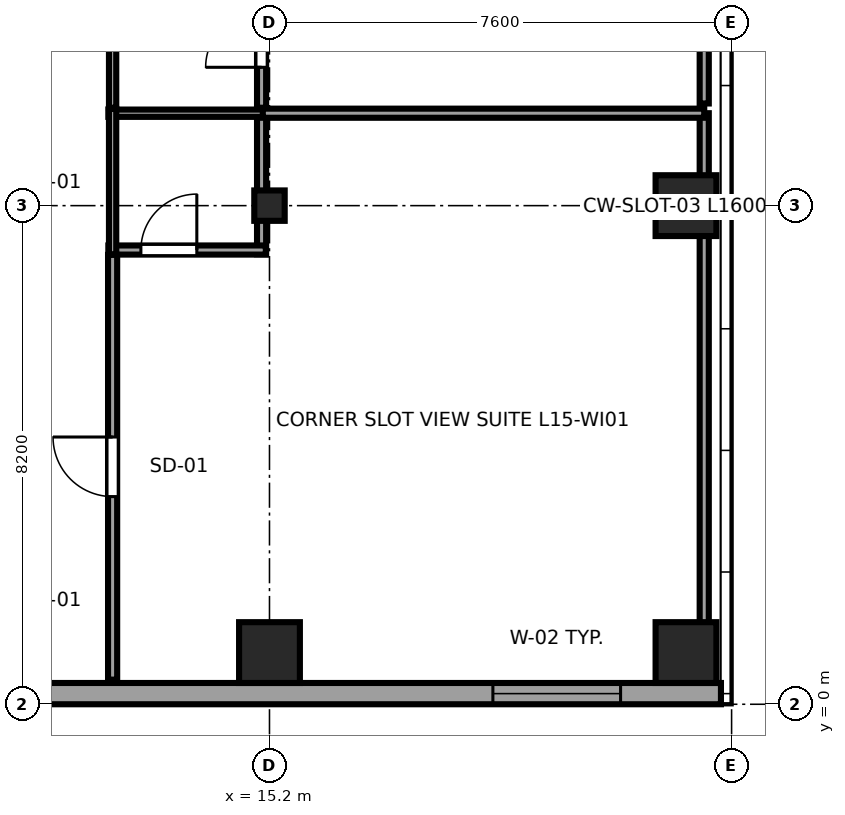
"""IFC4 building model, lengths in metres.
Left out: names, types, materials, properties, quantities, classifications, styles, units other than length and angle.
Written with IfcOpenShell. Run it as: python <this file> out.ifc"""

import sys

from ifc_helpers import new_model, si_unit, direction, frame, frame_2d, origin, origin_2d, place, context, subcontext, project, spatial, rectangle, i_section, extrude, source, transform, mapped, element, fill, save


model = new_model("IFC4")
c1 = context("Model", 3, precision=1e-05, world=origin(), true_north=direction((0.0, 1.0)))
c2 = subcontext(c1, "Body", "Model", "MODEL_VIEW")
j1 = project(units=[si_unit("LENGTHUNIT", "METRE"), si_unit("PLANEANGLEUNIT", "RADIAN")], contexts=[c1])
p1 = place(None, origin())
s1 = spatial("IfcSite", under=j1, at=p1, CompositionType="ELEMENT")
p2 = place(p1, origin())
s2 = spatial("IfcBuilding", under=s1, at=p2, CompositionType="ELEMENT")
p3 = place(p2, frame((0.0, 0.0, 63.95)))
s3 = spatial("IfcBuildingStorey", under=s2, at=p3, CompositionType="ELEMENT", Elevation=63.95)
m1 = source(origin(), c2, "Body", "SweptSolid", [
    extrude(rectangle(XDim=1.0, YDim=1.0, at=origin_2d()), origin(), (0.0, 0.0, 1.0), 3.55),
])
p4 = place(p3, frame((15.2, 0.85, 0.0), z_axis=(0.0, 0.0, 1.0), x_axis=(1.0, 0.0, 0.0)))
e1 = element("IfcColumn", 1, at=p4, inside=s3, PredefinedType="COLUMN", context=c2, shape_type="MappedRepresentation", body=[
    mapped(m1, transform((0.0, 0.0, 0.0), x_axis=(1.0, 0.0, 0.0), y_axis=(0.0, 1.0, 0.0), z_axis=(0.0, 0.0, 1.0), scale=1.0)),
])
m2 = source(origin(), c2, "Body", "SweptSolid", [
    extrude(i_section(OverallWidth=0.5, OverallDepth=0.5, WebThickness=0.028, FlangeThickness=0.045, at=origin_2d()), origin(), (0.0, 0.0, 1.0), 3.55),
])
p5 = place(p3, frame((15.2, 8.2, 0.0), z_axis=(0.0, 0.0, 1.0), x_axis=(1.0, 0.0, 0.0)))
e2 = element("IfcColumn", 2, at=p5, inside=s3, PredefinedType="COLUMN", context=c2, shape_type="MappedRepresentation", body=[
    mapped(m2, transform((0.0, 0.0, 0.0), x_axis=(1.0, 0.0, 0.0), y_axis=(0.0, 1.0, 0.0), z_axis=(0.0, 0.0, 1.0), scale=1.0)),
])
for number, where, z_axis, x_axis in (
    (3, (22.05, 0.85, 0.0), (0.0, 0.0, 1.0), (1.0, 0.0, 0.0)),
    (4, (22.05, 8.2, 0.0), (0.0, 0.0, 1.0), (1.0, 0.0, 0.0)),
):
    element("IfcColumn", number, at=place(p3, frame(where, z_axis=z_axis, x_axis=x_axis)), inside=s3, PredefinedType="COLUMN", context=c2, shape_type="MappedRepresentation", body=[
        mapped(m1, transform((0.0, 0.0, 0.0), x_axis=(1.0, 0.0, 0.0), y_axis=(0.0, 1.0, 0.0), z_axis=(0.0, 0.0, 1.0), scale=1.0)),
    ])
p6 = place(p3, frame((4.617, 0.175, 0.0), z_axis=(0.0, 0.0, 1.0), x_axis=(1.0, 0.0, 0.0)))
e5 = element("IfcWall", 5, at=p6, inside=s3, PredefinedType="SOLIDWALL", context=c2, shape_type="SweptSolid", body=[
    extrude(rectangle(XDim=18.008, YDim=0.35, at=frame_2d((9.004, 0.0))), origin(), (0.0, 0.0, 1.0), 3.37),
])
p7 = place(p6, frame((14.257, 0.0, 0.68)))
e6 = element("IfcOpeningElement", 6, at=p7, cuts=e5, PredefinedType="OPENING", context=c2, shape_type="SweptSolid", body=[
    extrude(rectangle(XDim=2.1, YDim=1.9, at=frame_2d((1.05, 0.95))), frame((0.0, 0.185, 0.0), z_axis=(0.0, -1.0, 0.0), x_axis=(1.0, 0.0, 0.0)), (0.0, 0.0, 1.0), 0.37),
])
p8 = place(p6, frame((3.7, 0.0, 0.62)))
e7 = element("IfcOpeningElement", 7, at=p8, cuts=e5, PredefinedType="OPENING", context=c2, shape_type="SweptSolid", body=[
    extrude(rectangle(XDim=1.5, YDim=1.55, at=frame_2d((0.75, 0.775))), frame((0.0, 0.185, 0.0), z_axis=(0.0, -1.0, 0.0), x_axis=(1.0, 0.0, 0.0)), (0.0, 0.0, 1.0), 0.37),
])
p9 = place(p3, frame((15.07, 7.4, 0.0), z_axis=(0.0, 0.0, 1.0), x_axis=(0.0, 1.0, 0.0)))
e8 = element("IfcWall", 8, at=p9, inside=s3, PredefinedType="PARTITIONING", context=c2, shape_type="SweptSolid", body=[
    extrude(rectangle(XDim=2.39, YDim=0.15, at=frame_2d((1.195, 0.0))), origin(), (0.0, 0.0, 1.0), 2.827),
])
p10 = place(p3, frame((12.55, 7.47, 0.0), z_axis=(0.0, 0.0, 1.0), x_axis=(1.0, 0.0, 0.0)))
e9 = element("IfcWall", 9, at=p10, inside=s3, PredefinedType="PARTITIONING", context=c2, shape_type="SweptSolid", body=[
    extrude(rectangle(XDim=2.59, YDim=0.15, at=frame_2d((1.295, 0.0))), origin(), (0.0, 0.0, 1.0), 3.37),
])
p11 = place(p10, frame((0.535, 0.0, 0.0)))
e10 = element("IfcOpeningElement", 10, at=p11, cuts=e9, PredefinedType="OPENING", context=c2, shape_type="SweptSolid", body=[
    extrude(rectangle(XDim=0.92, YDim=2.01, at=frame_2d((0.46, 1.005))), frame((0.0, 0.085, 0.0), z_axis=(0.0, -1.0, 0.0), x_axis=(1.0, 0.0, 0.0)), (0.0, 0.0, 1.0), 0.17),
])
p12 = place(p3, frame((12.55, 9.72, 0.0), z_axis=(0.0, 0.0, 1.0), x_axis=(1.0, 0.0, 0.0)))
e11 = element("IfcWall", 11, at=p12, inside=s3, PredefinedType="PLUMBINGWALL", context=c2, shape_type="SweptSolid", body=[
    extrude(rectangle(XDim=2.59, YDim=0.12, at=frame_2d((1.295, 0.0))), origin(), (0.0, 0.0, 1.0), 3.37),
])
p13 = place(p3, frame((12.62, 7.4, 0.0), z_axis=(0.0, 0.0, 1.0), x_axis=(0.0, 1.0, 0.0)))
e12 = element("IfcWall", 12, at=p13, inside=s3, PredefinedType="PLUMBINGWALL", context=c2, shape_type="SweptSolid", body=[
    extrude(rectangle(XDim=2.39, YDim=0.12, at=frame_2d((1.195, 0.0))), origin(), (0.0, 0.0, 1.0), 3.37),
])
p14 = place(p3, frame((15.07, 9.81, 0.0), z_axis=(0.0, 0.0, 1.0), x_axis=(0.0, 1.0, 0.0)))
e13 = element("IfcWall", 13, at=p14, inside=s3, PredefinedType="PARTITIONING", context=c2, shape_type="SweptSolid", body=[
    extrude(rectangle(XDim=2.39, YDim=0.15, at=frame_2d((1.195, 0.0))), origin(), (0.0, 0.0, 1.0), 2.827),
])
p15 = place(p14, frame((0.665, 0.0, 0.0)))
e14 = element("IfcOpeningElement", 14, at=p15, cuts=e13, PredefinedType="OPENING", context=c2, shape_type="SweptSolid", body=[
    extrude(rectangle(XDim=0.92, YDim=2.01, at=frame_2d((0.46, 1.005))), frame((0.0, 0.085, 0.0), z_axis=(0.0, -1.0, 0.0), x_axis=(1.0, 0.0, 0.0)), (0.0, 0.0, 1.0), 0.17),
])
p16 = place(p3, frame((12.62, 9.81, 0.0), z_axis=(0.0, 0.0, 1.0), x_axis=(0.0, 1.0, 0.0)))
e15 = element("IfcWall", 15, at=p16, inside=s3, PredefinedType="PLUMBINGWALL", context=c2, shape_type="SweptSolid", body=[
    extrude(rectangle(XDim=2.39, YDim=0.12, at=frame_2d((1.195, 0.0))), origin(), (0.0, 0.0, 1.0), 3.37),
])
p17 = place(p3, frame((12.62, 0.405, 0.0), z_axis=(0.0, 0.0, 1.0), x_axis=(0.0, 1.0, 0.0)))
e16 = element("IfcWall", 16, at=p17, inside=s3, PredefinedType="PARTITIONING", context=c2, shape_type="SweptSolid", body=[
    extrude(rectangle(XDim=6.985, YDim=0.15, at=frame_2d((3.492, 0.0))), origin(), (0.0, 0.0, 1.0), 3.37),
])
p18 = place(p17, frame((3.01, 0.0, 0.0)))
e17 = element("IfcOpeningElement", 17, at=p18, cuts=e16, PredefinedType="OPENING", context=c2, shape_type="SweptSolid", body=[
    extrude(rectangle(XDim=0.98, YDim=2.12, at=frame_2d((0.49, 1.06))), frame((0.0, 0.085, 0.0), z_axis=(0.0, -1.0, 0.0), x_axis=(1.0, 0.0, 0.0)), (0.0, 0.0, 1.0), 0.17),
])
p19 = place(p3, frame((22.35, 0.405, 0.0), z_axis=(0.0, 0.0, 1.0), x_axis=(0.0, 1.0, 0.0)))
e18 = element("IfcWall", 18, at=p19, inside=s3, PredefinedType="PARTITIONING", context=c2, shape_type="SweptSolid", body=[
    extrude(rectangle(XDim=9.315, YDim=0.15, at=frame_2d((4.657, 0.0))), origin(), (0.0, 0.0, 1.0), 3.37),
])
p20 = place(p3, frame((15.09, 9.72, 0.0), z_axis=(0.0, 0.0, 1.0), x_axis=(1.0, 0.0, 0.0)))
e19 = element("IfcWall", 19, at=p20, inside=s3, PredefinedType="PARTITIONING", context=c2, shape_type="SweptSolid", body=[
    extrude(rectangle(XDim=7.26, YDim=0.15, at=frame_2d((3.63, 0.0))), origin(), (0.0, 0.0, 1.0), 3.37),
])
p21 = place(p3, frame((22.35, 9.88, 0.0), z_axis=(0.0, 0.0, 1.0), x_axis=(0.0, 1.0, 0.0)))
e20 = element("IfcWall", 20, at=p21, inside=s3, PredefinedType="PARTITIONING", context=c2, shape_type="SweptSolid", body=[
    extrude(rectangle(XDim=10.34, YDim=0.15, at=frame_2d((5.17, 0.0))), origin(), (0.0, 0.0, 1.0), 3.37),
])
m3 = source(origin(), c2, "Body", "SweptSolid", [
    extrude(rectangle(XDim=2.1, YDim=1.9, at=frame_2d((1.05, 0.95))), frame((0.0, 0.09, 0.0), z_axis=(0.0, -1.0, 0.0), x_axis=(1.0, 0.0, 0.0)), (0.0, 0.0, 1.0), 0.06),
])
p22 = place(p7, origin())
e21 = element("IfcWindow", 21, at=p22, inside=s3, PartitioningType="TRIPLE_PANEL_HORIZONTAL", PredefinedType="WINDOW", context=c2, shape_type="MappedRepresentation", body=[
    mapped(m3, transform((0.0, 0.0, 0.0), x_axis=(1.0, 0.0, 0.0), y_axis=(0.0, 1.0, 0.0), z_axis=(0.0, 0.0, 1.0), scale=1.0)),
])
fill(e6, e21)
m4 = source(origin(), c2, "Body", "SweptSolid", [
    extrude(rectangle(XDim=0.92, YDim=2.01, at=frame_2d((0.46, 1.005))), frame((0.0, 0.025, 0.0), z_axis=(0.0, -1.0, 0.0), x_axis=(1.0, 0.0, 0.0)), (0.0, 0.0, 1.0), 0.05),
])
p23 = place(p11, origin())
e22 = element("IfcDoor", 22, at=p23, inside=s3, OperationType="SINGLE_SWING_RIGHT", PredefinedType="DOOR", context=c2, shape_type="MappedRepresentation", body=[
    mapped(m4, transform((0.0, 0.0, 0.0), x_axis=(1.0, 0.0, 0.0), y_axis=(0.0, 1.0, 0.0), z_axis=(0.0, 0.0, 1.0), scale=1.0)),
])
fill(e10, e22)
p24 = place(p15, origin())
e23 = element("IfcDoor", 23, at=p24, inside=s3, OperationType="SINGLE_SWING_LEFT", PredefinedType="DOOR", context=c2, shape_type="MappedRepresentation", body=[
    mapped(m4, transform((0.0, 0.0, 0.0), x_axis=(1.0, 0.0, 0.0), y_axis=(0.0, 1.0, 0.0), z_axis=(0.0, 0.0, 1.0), scale=1.0)),
])
fill(e14, e23)
m5 = source(origin(), c2, "Body", "SweptSolid", [
    extrude(rectangle(XDim=0.98, YDim=2.12, at=frame_2d((0.49, 1.06))), frame((0.0, 0.025, 0.0), z_axis=(0.0, -1.0, 0.0), x_axis=(1.0, 0.0, 0.0)), (0.0, 0.0, 1.0), 0.05),
])
p25 = place(p18, origin())
e24 = element("IfcDoor", 24, at=p25, inside=s3, OperationType="SINGLE_SWING_RIGHT", PredefinedType="DOOR", context=c2, shape_type="MappedRepresentation", body=[
    mapped(m5, transform((0.0, 0.0, 0.0), x_axis=(1.0, 0.0, 0.0), y_axis=(0.0, 1.0, 0.0), z_axis=(0.0, 0.0, 1.0), scale=1.0)),
])
fill(e17, e24)
save(model, sys.argv[1])
